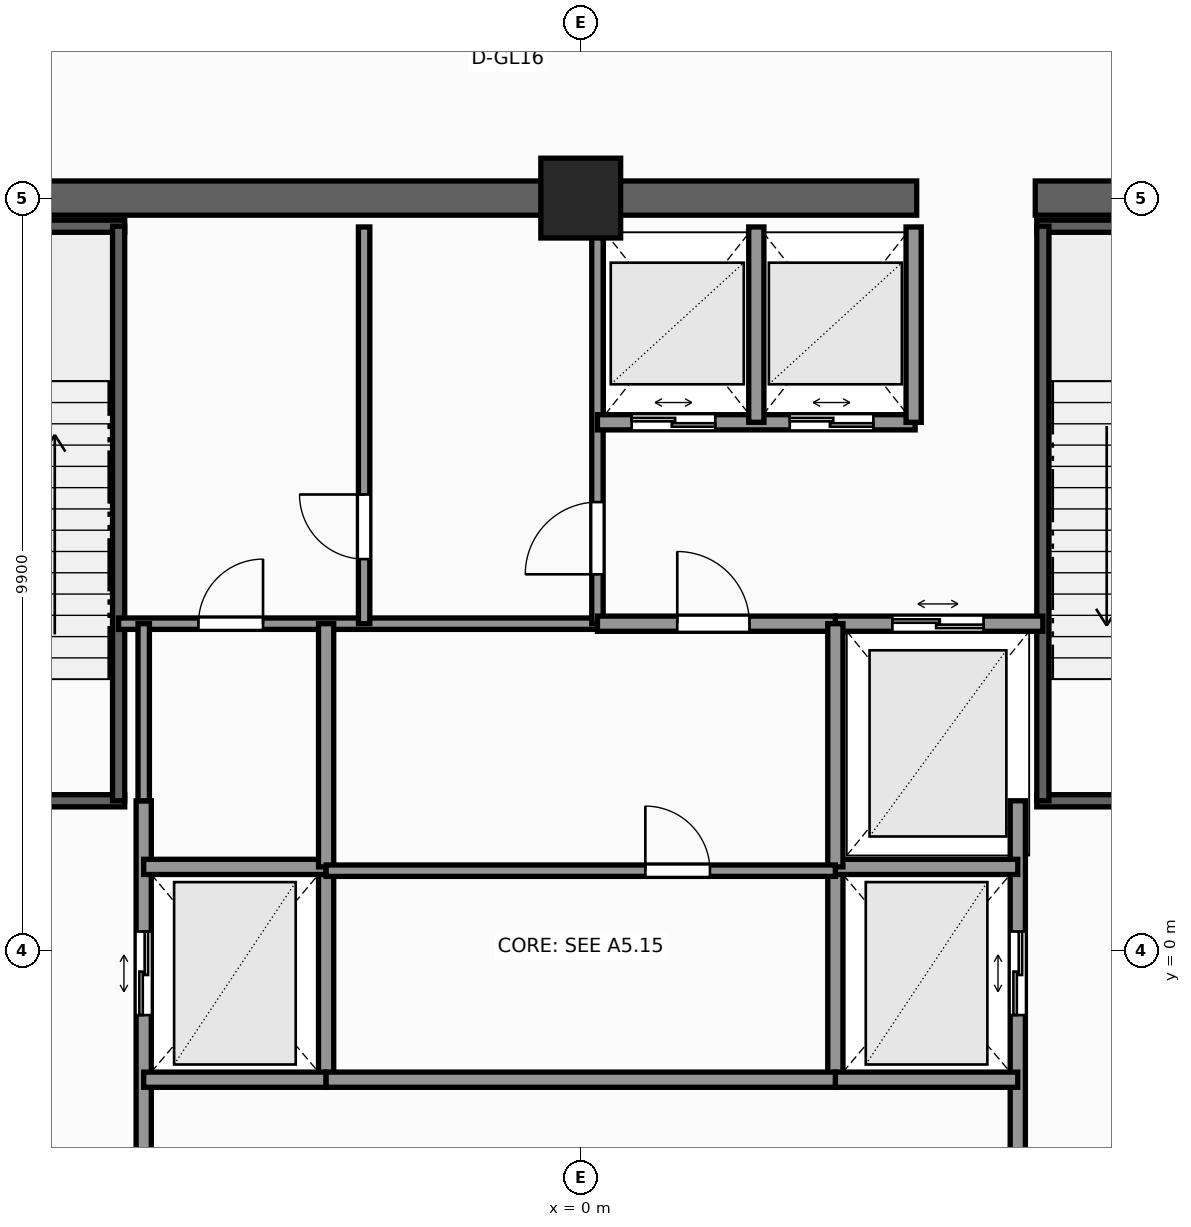
"""IFC4 building model, lengths in metres.
Left out: names, types, materials, properties, quantities, classifications, styles, units other than length and angle.
Written with IfcOpenShell. Run it as: python <this file> out.ifc"""

import sys

from ifc_helpers import new_model, si_unit, direction, frame, frame_2d, origin, origin_2d, place, context, subcontext, project, spatial, rectangle, extrude, element, fill, save


model = new_model("IFC4")
c1 = context("Model", 3, precision=1e-05, world=origin(), true_north=direction((0.0, 1.0)))
c2 = subcontext(c1, "Body", "Model", "MODEL_VIEW")
j1 = project(units=[si_unit("LENGTHUNIT", "METRE"), si_unit("PLANEANGLEUNIT", "RADIAN")], contexts=[c1])
p1 = place(None, origin())
s1 = spatial("IfcSite", under=j1, at=p1, CompositionType="ELEMENT")
p2 = place(p1, origin())
s2 = spatial("IfcBuilding", under=s1, at=p2, CompositionType="ELEMENT")
p3 = place(p2, frame((0.0, 0.0, 267.4)))
s3 = spatial("IfcBuildingStorey", under=s2, at=p3, CompositionType="ELEMENT", Elevation=267.4)
p4 = place(p3, frame((-10.125, 9.9, 0.0), z_axis=(0.0, 0.0, 1.0), x_axis=(1.0, 0.0, 0.0)))
e1 = element("IfcWall", 1, at=p4, inside=s3, PredefinedType="SHEAR", context=c2, shape_type="SweptSolid", body=[
    extrude(rectangle(XDim=14.545, YDim=0.45, at=frame_2d((7.272, 0.0))), origin(), (0.0, 0.0, 1.0), 5.0),
])
p5 = place(p3, frame((5.98, 9.9, 0.0), z_axis=(0.0, 0.0, 1.0), x_axis=(1.0, 0.0, 0.0)))
e2 = element("IfcWall", 2, at=p5, inside=s3, PredefinedType="SHEAR", context=c2, shape_type="SweptSolid", body=[
    extrude(rectangle(XDim=4.145, YDim=0.45, at=frame_2d((2.073, 0.0))), origin(), (0.0, 0.0, 1.0), 5.0),
])
p6 = place(p3, frame((0.0, 9.9, 0.0), z_axis=(0.0, 0.0, 1.0), x_axis=(1.0, 0.0, 0.0)))
e3 = element("IfcColumn", 3, at=p6, inside=s3, PredefinedType="COLUMN", context=c2, shape_type="SweptSolid", body=[
    extrude(rectangle(XDim=1.05, YDim=1.05, at=origin_2d()), origin(), (0.0, 0.0, 1.0), 5.0),
])
p7 = place(p3, frame((-9.52, 1.97, 0.0), z_axis=(0.0, 0.0, 1.0), x_axis=(1.0, 0.0, 0.0)))
e4 = element("IfcWall", 4, at=p7, inside=s3, PredefinedType="SHEAR", context=c2, shape_type="SweptSolid", body=[
    extrude(rectangle(XDim=3.52, YDim=0.16, at=frame_2d((1.76, 0.0))), origin(), (0.0, 0.0, 1.0), 5.0),
])
p8 = place(p7, frame((1.15, 0.0, 0.0)))
e5 = element("IfcOpeningElement", 5, at=p8, cuts=e4, PredefinedType="OPENING", context=c2, shape_type="SweptSolid", body=[
    extrude(rectangle(XDim=1.1, YDim=2.2, at=frame_2d((0.55, 1.1))), frame((0.0, 0.09, 0.0), z_axis=(0.0, -1.0, 0.0), x_axis=(1.0, 0.0, 0.0)), (0.0, 0.0, 1.0), 0.18),
])
p9 = place(p3, frame((-9.52, 9.53, 0.0), z_axis=(0.0, 0.0, 1.0), x_axis=(1.0, 0.0, 0.0)))
e6 = element("IfcWall", 6, at=p9, inside=s3, PredefinedType="SHEAR", context=c2, shape_type="SweptSolid", body=[
    extrude(rectangle(XDim=3.52, YDim=0.16, at=frame_2d((1.76, 0.0))), origin(), (0.0, 0.0, 1.0), 5.0),
])
p10 = place(p3, frame((-6.08, 1.97, 0.0), z_axis=(0.0, 0.0, 1.0), x_axis=(0.0, 1.0, 0.0)))
e7 = element("IfcWall", 7, at=p10, inside=s3, PredefinedType="SHEAR", context=c2, shape_type="SweptSolid", body=[
    extrude(rectangle(XDim=7.56, YDim=0.16, at=frame_2d((3.78, 0.0))), origin(), (0.0, 0.0, 1.0), 5.0),
])
p11 = place(p3, frame((6.0, 1.97, 0.0), z_axis=(0.0, 0.0, 1.0), x_axis=(1.0, 0.0, 0.0)))
e8 = element("IfcWall", 8, at=p11, inside=s3, PredefinedType="SHEAR", context=c2, shape_type="SweptSolid", body=[
    extrude(rectangle(XDim=3.52, YDim=0.16, at=frame_2d((1.76, 0.0))), origin(), (0.0, 0.0, 1.0), 5.0),
])
p12 = place(p11, frame((1.15, 0.0, 0.0)))
e9 = element("IfcOpeningElement", 9, at=p12, cuts=e8, PredefinedType="OPENING", context=c2, shape_type="SweptSolid", body=[
    extrude(rectangle(XDim=1.1, YDim=2.2, at=frame_2d((0.55, 1.1))), frame((0.0, 0.09, 0.0), z_axis=(0.0, -1.0, 0.0), x_axis=(1.0, 0.0, 0.0)), (0.0, 0.0, 1.0), 0.18),
])
p13 = place(p3, frame((6.0, 9.53, 0.0), z_axis=(0.0, 0.0, 1.0), x_axis=(1.0, 0.0, 0.0)))
e10 = element("IfcWall", 10, at=p13, inside=s3, PredefinedType="SHEAR", context=c2, shape_type="SweptSolid", body=[
    extrude(rectangle(XDim=3.52, YDim=0.16, at=frame_2d((1.76, 0.0))), origin(), (0.0, 0.0, 1.0), 5.0),
])
p14 = place(p3, frame((6.08, 1.97, 0.0), z_axis=(0.0, 0.0, 1.0), x_axis=(0.0, 1.0, 0.0)))
e11 = element("IfcWall", 11, at=p14, inside=s3, PredefinedType="SHEAR", context=c2, shape_type="SweptSolid", body=[
    extrude(rectangle(XDim=7.56, YDim=0.16, at=frame_2d((3.78, 0.0))), origin(), (0.0, 0.0, 1.0), 5.0),
])
p15 = place(p3, frame((-5.75, -3.6, 0.0), z_axis=(0.0, 0.0, 1.0), x_axis=(0.0, 1.0, 0.0)))
e12 = element("IfcWall", 12, at=p15, inside=s3, PredefinedType="SOLIDWALL", context=c2, shape_type="SweptSolid", body=[
    extrude(rectangle(XDim=5.57, YDim=0.2, at=frame_2d((2.785, 0.0))), origin(), (0.0, 0.0, 1.0), 4.7),
])
p16 = place(p15, frame((2.75, 0.0, 0.0)))
e13 = element("IfcOpeningElement", 13, at=p16, cuts=e12, PredefinedType="OPENING", context=c2, shape_type="SweptSolid", body=[
    extrude(rectangle(XDim=1.1, YDim=2.2, at=frame_2d((0.55, 1.1))), frame((0.0, 0.11, 0.0), z_axis=(0.0, -1.0, 0.0), x_axis=(1.0, 0.0, 0.0)), (0.0, 0.0, 1.0), 0.22),
])
p17 = place(p3, frame((-3.35, -1.7, 0.0), z_axis=(0.0, 0.0, 1.0), x_axis=(0.0, 1.0, 0.0)))
e14 = element("IfcWall", 14, at=p17, inside=s3, PredefinedType="SOLIDWALL", context=c2, shape_type="SweptSolid", body=[
    extrude(rectangle(XDim=2.8, YDim=0.2, at=frame_2d((1.4, 0.0))), origin(), (0.0, 0.0, 1.0), 4.7),
])
for number, where, z_axis, x_axis in (
    (15, (-5.75, -1.7, 0.0), (0.0, 0.0, 1.0), (1.0, 0.0, 0.0)),
    (16, (-5.75, 1.1, 0.0), (0.0, 0.0, 1.0), (1.0, 0.0, 0.0)),
):
    element("IfcWall", number, at=place(p3, frame(where, z_axis=z_axis, x_axis=x_axis)), inside=s3, PredefinedType="SOLIDWALL", context=c2, shape_type="SweptSolid", body=[
        extrude(rectangle(XDim=2.4, YDim=0.2, at=frame_2d((1.2, 0.0))), origin(), (0.0, 0.0, 1.0), 4.7),
    ])
p18 = place(p3, frame((5.75, -3.6, 0.0), z_axis=(0.0, 0.0, 1.0), x_axis=(0.0, 1.0, 0.0)))
e17 = element("IfcWall", 17, at=p18, inside=s3, PredefinedType="SOLIDWALL", context=c2, shape_type="SweptSolid", body=[
    extrude(rectangle(XDim=5.57, YDim=0.2, at=frame_2d((2.785, 0.0))), origin(), (0.0, 0.0, 1.0), 4.7),
])
p19 = place(p18, frame((2.75, 0.0, 0.0)))
e18 = element("IfcOpeningElement", 18, at=p19, cuts=e17, PredefinedType="OPENING", context=c2, shape_type="SweptSolid", body=[
    extrude(rectangle(XDim=1.1, YDim=2.2, at=frame_2d((0.55, 1.1))), frame((0.0, 0.11, 0.0), z_axis=(0.0, -1.0, 0.0), x_axis=(1.0, 0.0, 0.0)), (0.0, 0.0, 1.0), 0.22),
])
p20 = place(p3, frame((3.35, -1.7, 0.0), z_axis=(0.0, 0.0, 1.0), x_axis=(0.0, 1.0, 0.0)))
e19 = element("IfcWall", 19, at=p20, inside=s3, PredefinedType="SOLIDWALL", context=c2, shape_type="SweptSolid", body=[
    extrude(rectangle(XDim=2.8, YDim=0.2, at=frame_2d((1.4, 0.0))), origin(), (0.0, 0.0, 1.0), 4.7),
])
for number, where, z_axis, x_axis in (
    (20, (3.35, -1.7, 0.0), (0.0, 0.0, 1.0), (1.0, 0.0, 0.0)),
    (21, (3.35, 1.1, 0.0), (0.0, 0.0, 1.0), (1.0, 0.0, 0.0)),
):
    element("IfcWall", number, at=place(p3, frame(where, z_axis=z_axis, x_axis=x_axis)), inside=s3, PredefinedType="SOLIDWALL", context=c2, shape_type="SweptSolid", body=[
        extrude(rectangle(XDim=2.4, YDim=0.2, at=frame_2d((1.2, 0.0))), origin(), (0.0, 0.0, 1.0), 4.7),
    ])
p21 = place(p3, frame((3.35, 4.3, 0.0), z_axis=(0.0, 0.0, 1.0), x_axis=(1.0, 0.0, 0.0)))
e22 = element("IfcWall", 22, at=p21, inside=s3, PredefinedType="SOLIDWALL", context=c2, shape_type="SweptSolid", body=[
    extrude(rectangle(XDim=2.73, YDim=0.2, at=frame_2d((1.365, 0.0))), origin(), (0.0, 0.0, 1.0), 4.7),
])
p22 = place(p21, frame((0.75, 0.0, 0.0)))
e23 = element("IfcOpeningElement", 23, at=p22, cuts=e22, PredefinedType="OPENING", context=c2, shape_type="SweptSolid", body=[
    extrude(rectangle(XDim=1.2, YDim=2.25, at=frame_2d((0.6, 1.125))), frame((0.0, 0.11, 0.0), z_axis=(0.0, -1.0, 0.0), x_axis=(1.0, 0.0, 0.0)), (0.0, 0.0, 1.0), 0.22),
])
p23 = place(p3, frame((-6.08, 4.3, 0.0), z_axis=(0.0, 0.0, 1.0), x_axis=(1.0, 0.0, 0.0)))
e24 = element("IfcWall", 24, at=p23, inside=s3, PredefinedType="PARTITIONING", context=c2, shape_type="SweptSolid", body=[
    extrude(rectangle(XDim=6.3, YDim=0.15, at=frame_2d((3.15, 0.0))), origin(), (0.0, 0.0, 1.0), 4.7),
])
p24 = place(p23, frame((1.05, 0.0, 0.0)))
e25 = element("IfcOpeningElement", 25, at=p24, cuts=e24, PredefinedType="OPENING", context=c2, shape_type="SweptSolid", body=[
    extrude(rectangle(XDim=0.85, YDim=2.03, at=frame_2d((0.425, 1.015))), frame((0.0, 0.085, 0.0), z_axis=(0.0, -1.0, 0.0), x_axis=(1.0, 0.0, 0.0)), (0.0, 0.0, 1.0), 0.17),
])
p25 = place(p3, frame((0.22, 4.3, 0.0), z_axis=(0.0, 0.0, 1.0), x_axis=(0.0, 1.0, 0.0)))
e26 = element("IfcWall", 26, at=p25, inside=s3, PredefinedType="PARTITIONING", context=c2, shape_type="SweptSolid", body=[
    extrude(rectangle(XDim=5.22, YDim=0.15, at=frame_2d((2.61, 0.0))), origin(), (0.0, 0.0, 1.0), 4.7),
])
p26 = place(p25, frame((0.65, 0.0, 0.0)))
e27 = element("IfcOpeningElement", 27, at=p26, cuts=e26, PredefinedType="OPENING", context=c2, shape_type="SweptSolid", body=[
    extrude(rectangle(XDim=0.95, YDim=2.06, at=frame_2d((0.475, 1.03))), frame((0.0, 0.085, 0.0), z_axis=(0.0, -1.0, 0.0), x_axis=(1.0, 0.0, 0.0)), (0.0, 0.0, 1.0), 0.17),
])
p27 = place(p3, frame((-2.85, 4.3, 0.0), z_axis=(0.0, 0.0, 1.0), x_axis=(0.0, 1.0, 0.0)))
e28 = element("IfcWall", 28, at=p27, inside=s3, PredefinedType="PARTITIONING", context=c2, shape_type="SweptSolid", body=[
    extrude(rectangle(XDim=5.22, YDim=0.15, at=frame_2d((2.61, 0.0))), origin(), (0.0, 0.0, 1.0), 4.7),
])
p28 = place(p27, frame((0.85, 0.0, 0.0)))
e29 = element("IfcOpeningElement", 29, at=p28, cuts=e28, PredefinedType="OPENING", context=c2, shape_type="SweptSolid", body=[
    extrude(rectangle(XDim=0.85, YDim=2.03, at=frame_2d((0.425, 1.015))), frame((0.0, 0.085, 0.0), z_axis=(0.0, -1.0, 0.0), x_axis=(1.0, 0.0, 0.0)), (0.0, 0.0, 1.0), 0.17),
])
p29 = place(p3, frame((0.22, 6.95, 0.0), z_axis=(0.0, 0.0, 1.0), x_axis=(1.0, 0.0, 0.0)))
e30 = element("IfcWall", 30, at=p29, inside=s3, PredefinedType="SOLIDWALL", context=c2, shape_type="SweptSolid", body=[
    extrude(rectangle(XDim=4.18, YDim=0.2, at=frame_2d((2.09, 0.0))), origin(), (0.0, 0.0, 1.0), 4.7),
])
p30 = place(p29, frame((0.45, 0.0, 0.0)))
e31 = element("IfcOpeningElement", 31, at=p30, cuts=e30, PredefinedType="OPENING", context=c2, shape_type="SweptSolid", body=[
    extrude(rectangle(XDim=1.1, YDim=2.2, at=frame_2d((0.55, 1.1))), frame((0.0, 0.11, 0.0), z_axis=(0.0, -1.0, 0.0), x_axis=(1.0, 0.0, 0.0)), (0.0, 0.0, 1.0), 0.22),
])
p31 = place(p29, frame((2.53, 0.0, 0.0)))
e32 = element("IfcOpeningElement", 32, at=p31, cuts=e30, PredefinedType="OPENING", context=c2, shape_type="SweptSolid", body=[
    extrude(rectangle(XDim=1.1, YDim=2.2, at=frame_2d((0.55, 1.1))), frame((0.0, 0.11, 0.0), z_axis=(0.0, -1.0, 0.0), x_axis=(1.0, 0.0, 0.0)), (0.0, 0.0, 1.0), 0.22),
])
for number, where, z_axis, x_axis in (
    (33, (4.38, 6.95, 0.0), (0.0, 0.0, 1.0), (0.0, 1.0, 0.0)),
    (34, (2.31, 6.95, 0.0), (0.0, 0.0, 1.0), (0.0, 1.0, 0.0)),
):
    element("IfcWall", number, at=place(p3, frame(where, z_axis=z_axis, x_axis=x_axis)), inside=s3, PredefinedType="SOLIDWALL", context=c2, shape_type="SweptSolid", body=[
        extrude(rectangle(XDim=2.57, YDim=0.2, at=frame_2d((1.285, 0.0))), origin(), (0.0, 0.0, 1.0), 4.7),
    ])
p32 = place(p3, frame((0.22, 4.3, 0.0), z_axis=(0.0, 0.0, 1.0), x_axis=(1.0, 0.0, 0.0)))
e35 = element("IfcWall", 35, at=p32, inside=s3, PredefinedType="SOLIDWALL", context=c2, shape_type="SweptSolid", body=[
    extrude(rectangle(XDim=3.13, YDim=0.2, at=frame_2d((1.565, 0.0))), origin(), (0.0, 0.0, 1.0), 4.7),
])
p33 = place(p32, frame((1.05, 0.0, 0.0)))
e36 = element("IfcOpeningElement", 36, at=p33, cuts=e35, PredefinedType="OPENING", context=c2, shape_type="SweptSolid", body=[
    extrude(rectangle(XDim=0.95, YDim=2.06, at=frame_2d((0.475, 1.03))), frame((0.0, 0.11, 0.0), z_axis=(0.0, -1.0, 0.0), x_axis=(1.0, 0.0, 0.0)), (0.0, 0.0, 1.0), 0.22),
])
p34 = place(p3, frame((-3.35, -1.7, 0.0), z_axis=(0.0, 0.0, 1.0), x_axis=(1.0, 0.0, 0.0)))
e37 = element("IfcWall", 37, at=p34, inside=s3, PredefinedType="SOLIDWALL", context=c2, shape_type="SweptSolid", body=[
    extrude(rectangle(XDim=6.7, YDim=0.2, at=frame_2d((3.35, 0.0))), origin(), (0.0, 0.0, 1.0), 4.7),
])
for number, where, z_axis, x_axis in (
    (38, (-3.35, 1.1, 0.0), (0.0, 0.0, 1.0), (0.0, 1.0, 0.0)),
    (39, (3.35, 1.1, 0.0), (0.0, 0.0, 1.0), (0.0, 1.0, 0.0)),
):
    element("IfcWall", number, at=place(p3, frame(where, z_axis=z_axis, x_axis=x_axis)), inside=s3, PredefinedType="SOLIDWALL", context=c2, shape_type="SweptSolid", body=[
        extrude(rectangle(XDim=3.2, YDim=0.2, at=frame_2d((1.6, 0.0))), origin(), (0.0, 0.0, 1.0), 4.7),
    ])
p35 = place(p3, frame((-3.35, 1.05, 0.0), z_axis=(0.0, 0.0, 1.0), x_axis=(1.0, 0.0, 0.0)))
e40 = element("IfcWall", 40, at=p35, inside=s3, PredefinedType="PARTITIONING", context=c2, shape_type="SweptSolid", body=[
    extrude(rectangle(XDim=6.7, YDim=0.15, at=frame_2d((3.35, 0.0))), origin(), (0.0, 0.0, 1.0), 4.7),
])
p36 = place(p35, frame((4.2, 0.0, 0.0)))
e41 = element("IfcOpeningElement", 41, at=p36, cuts=e40, PredefinedType="OPENING", context=c2, shape_type="SweptSolid", body=[
    extrude(rectangle(XDim=0.85, YDim=2.03, at=frame_2d((0.425, 1.015))), frame((0.0, 0.085, 0.0), z_axis=(0.0, -1.0, 0.0), x_axis=(1.0, 0.0, 0.0)), (0.0, 0.0, 1.0), 0.17),
])
p37 = place(p3, frame((-5.75, 1.97, 0.0), z_axis=(0.0, 0.0, 1.0), x_axis=(0.0, 1.0, 0.0)))
e42 = element("IfcWall", 42, at=p37, inside=s3, PredefinedType="PARTITIONING", context=c2, shape_type="SweptSolid", body=[
    extrude(rectangle(XDim=2.33, YDim=0.15, at=frame_2d((1.165, 0.0))), origin(), (0.0, 0.0, 1.0), 4.7),
])
p38 = place(p16, origin())
e43 = element("IfcDoor", 43, at=p38, inside=s3, OperationType="DOUBLE_DOOR_SLIDING", PredefinedType="DOOR", context=c2, shape_type="SweptSolid", body=[
    extrude(rectangle(XDim=1.1, YDim=2.2, at=frame_2d((0.55, 1.1))), frame((0.0, 0.025, 0.0), z_axis=(0.0, -1.0, 0.0), x_axis=(1.0, 0.0, 0.0)), (0.0, 0.0, 1.0), 0.05),
])
fill(e13, e43)
p39 = place(p19, origin())
e44 = element("IfcDoor", 44, at=p39, inside=s3, OperationType="DOUBLE_DOOR_SLIDING", PredefinedType="DOOR", context=c2, shape_type="SweptSolid", body=[
    extrude(rectangle(XDim=1.1, YDim=2.2, at=frame_2d((0.55, 1.1))), frame((0.0, 0.025, 0.0), z_axis=(0.0, -1.0, 0.0), x_axis=(1.0, 0.0, 0.0)), (0.0, 0.0, 1.0), 0.05),
])
fill(e18, e44)
p40 = place(p22, origin())
e45 = element("IfcDoor", 45, at=p40, inside=s3, OperationType="DOUBLE_DOOR_SLIDING", PredefinedType="DOOR", context=c2, shape_type="SweptSolid", body=[
    extrude(rectangle(XDim=1.2, YDim=2.25, at=frame_2d((0.6, 1.125))), frame((0.0, 0.025, 0.0), z_axis=(0.0, -1.0, 0.0), x_axis=(1.0, 0.0, 0.0)), (0.0, 0.0, 1.0), 0.05),
])
fill(e23, e45)
p41 = place(p26, origin())
e46 = element("IfcDoor", 46, at=p41, inside=s3, OperationType="SINGLE_SWING_LEFT", PredefinedType="DOOR", context=c2, shape_type="SweptSolid", body=[
    extrude(rectangle(XDim=0.95, YDim=2.06, at=frame_2d((0.475, 1.03))), frame((0.0, 0.025, 0.0), z_axis=(0.0, -1.0, 0.0), x_axis=(1.0, 0.0, 0.0)), (0.0, 0.0, 1.0), 0.05),
])
fill(e27, e46)
p42 = place(p28, origin())
e47 = element("IfcDoor", 47, at=p42, inside=s3, OperationType="SINGLE_SWING_RIGHT", PredefinedType="DOOR", context=c2, shape_type="SweptSolid", body=[
    extrude(rectangle(XDim=0.85, YDim=2.03, at=frame_2d((0.425, 1.015))), frame((0.0, 0.025, 0.0), z_axis=(0.0, -1.0, 0.0), x_axis=(1.0, 0.0, 0.0)), (0.0, 0.0, 1.0), 0.05),
])
fill(e29, e47)
p43 = place(p30, origin())
e48 = element("IfcDoor", 48, at=p43, inside=s3, OperationType="DOUBLE_DOOR_SLIDING", PredefinedType="DOOR", context=c2, shape_type="SweptSolid", body=[
    extrude(rectangle(XDim=1.1, YDim=2.2, at=frame_2d((0.55, 1.1))), frame((0.0, 0.025, 0.0), z_axis=(0.0, -1.0, 0.0), x_axis=(1.0, 0.0, 0.0)), (0.0, 0.0, 1.0), 0.05),
])
fill(e31, e48)
p44 = place(p31, origin())
e49 = element("IfcDoor", 49, at=p44, inside=s3, OperationType="DOUBLE_DOOR_SLIDING", PredefinedType="DOOR", context=c2, shape_type="SweptSolid", body=[
    extrude(rectangle(XDim=1.1, YDim=2.2, at=frame_2d((0.55, 1.1))), frame((0.0, 0.025, 0.0), z_axis=(0.0, -1.0, 0.0), x_axis=(1.0, 0.0, 0.0)), (0.0, 0.0, 1.0), 0.05),
])
fill(e32, e49)
p45 = place(p33, origin())
e50 = element("IfcDoor", 50, at=p45, inside=s3, OperationType="SINGLE_SWING_LEFT", PredefinedType="DOOR", context=c2, shape_type="SweptSolid", body=[
    extrude(rectangle(XDim=0.95, YDim=2.06, at=frame_2d((0.475, 1.03))), frame((0.0, 0.025, 0.0), z_axis=(0.0, -1.0, 0.0), x_axis=(1.0, 0.0, 0.0)), (0.0, 0.0, 1.0), 0.05),
])
fill(e36, e50)
p46 = place(p36, origin())
e51 = element("IfcDoor", 51, at=p46, inside=s3, OperationType="SINGLE_SWING_LEFT", PredefinedType="DOOR", context=c2, shape_type="SweptSolid", body=[
    extrude(rectangle(XDim=0.85, YDim=2.03, at=frame_2d((0.425, 1.015))), frame((0.0, 0.025, 0.0), z_axis=(0.0, -1.0, 0.0), x_axis=(1.0, 0.0, 0.0)), (0.0, 0.0, 1.0), 0.05),
])
fill(e41, e51)
p47 = place(p24, origin())
e52 = element("IfcDoor", 52, at=p47, inside=s3, OperationType="SINGLE_SWING_RIGHT", PredefinedType="DOOR", context=c2, shape_type="SweptSolid", body=[
    extrude(rectangle(XDim=0.85, YDim=2.03, at=frame_2d((0.425, 1.015))), frame((0.0, 0.025, 0.0), z_axis=(0.0, -1.0, 0.0), x_axis=(1.0, 0.0, 0.0)), (0.0, 0.0, 1.0), 0.05),
])
fill(e25, e52)
save(model, sys.argv[1])
